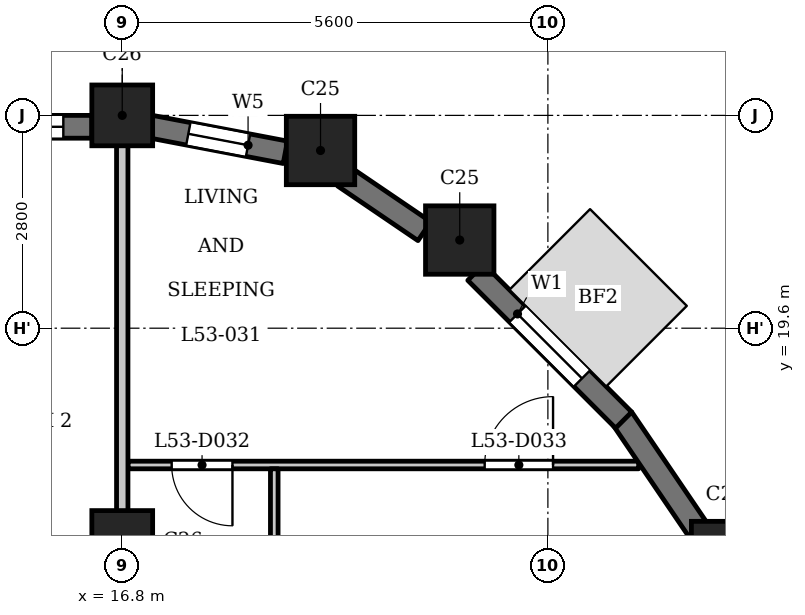
"""IFC4 building model, lengths in metres.
Left out: names, types, materials, properties, quantities, classifications, styles, units other than length and angle.
Written with IfcOpenShell. Run it as: python <this file> out.ifc"""

import sys

from ifc_helpers import new_model, si_unit, direction, frame, frame_2d, origin, origin_2d, place, context, subcontext, project, spatial, rectangle, extrude, element, fill, save


model = new_model("IFC4")
c1 = context("Model", 3, precision=1e-05, world=origin(), true_north=direction((0.0, 1.0)))
c2 = subcontext(c1, "Body", "Model", "MODEL_VIEW")
j1 = project(units=[si_unit("LENGTHUNIT", "METRE"), si_unit("PLANEANGLEUNIT", "RADIAN")], contexts=[c1])
p1 = place(None, origin())
s1 = spatial("IfcSite", under=j1, at=p1, CompositionType="ELEMENT")
p2 = place(p1, origin())
s2 = spatial("IfcBuilding", under=s1, at=p2, CompositionType="ELEMENT")
p3 = place(p2, frame((0.0, 0.0, 206.4)))
s3 = spatial("IfcBuildingStorey", under=s2, at=p3, CompositionType="ELEMENT", Elevation=206.4)
for number, where, z_axis, x_axis in (
    (1, (24.738, 16.609, 0.0), (0.0, 0.0, 1.0), (1.0, 0.0, 0.0)),
    (2, (21.24, 20.76, 0.0), (0.0, 0.0, 1.0), (1.0, 0.0, 0.0)),
    (3, (19.409, 21.938, 0.0), (0.0, 0.0, 1.0), (1.0, 0.0, 0.0)),
):
    element("IfcColumn", number, at=place(p3, frame(where, z_axis=z_axis, x_axis=x_axis)), inside=s3, PredefinedType="COLUMN", context=c2, shape_type="SweptSolid", body=[
        extrude(rectangle(XDim=0.9, YDim=0.9, at=origin_2d()), origin(), (0.0, 0.0, 1.0), 3.5),
    ])
for number, where, z_axis, x_axis in (
    (4, (16.8, 16.8, 0.0), (0.0, 0.0, 1.0), (1.0, 0.0, 0.0)),
    (5, (16.8, 22.4, 0.0), (0.0, 0.0, 1.0), (1.0, 0.0, 0.0)),
):
    element("IfcColumn", number, at=place(p3, frame(where, z_axis=z_axis, x_axis=x_axis)), inside=s3, PredefinedType="COLUMN", context=c2, shape_type="SweptSolid", body=[
        extrude(rectangle(XDim=0.8, YDim=0.8, at=origin_2d()), origin(), (0.0, 0.0, 1.0), 3.5),
    ])
p4 = place(p3, frame((24.394, 16.919, 0.0), z_axis=(0.0, 0.0, 1.0), x_axis=(-0.562040093569, 0.827109988588, 0.0)))
e6 = element("IfcWall", 6, at=p4, inside=s3, PredefinedType="SOLIDWALL", context=c2, shape_type="SweptSolid", body=[
    extrude(rectangle(XDim=1.806, YDim=0.3, at=frame_2d((0.903, 0.0))), origin(), (0.0, 0.0, 1.0), 2.5),
])
p5 = place(p3, frame((23.397, 18.391, 0.0), z_axis=(0.0, 0.0, 1.0), x_axis=(-0.707106781187, 0.707106781187, 0.0)))
e7 = element("IfcWall", 7, at=p5, inside=s3, PredefinedType="SOLIDWALL", context=c2, shape_type="SweptSolid", body=[
    extrude(rectangle(XDim=2.75, YDim=0.3, at=frame_2d((1.375, 0.0))), origin(), (0.0, 0.0, 1.0), 2.5),
])
p6 = place(p5, frame((0.775, 0.0, 0.6)))
e8 = element("IfcOpeningElement", 8, at=p6, cuts=e7, PredefinedType="OPENING", context=c2, shape_type="SweptSolid", body=[
    extrude(rectangle(XDim=1.2, YDim=1.55, at=frame_2d((0.6, 0.775))), frame((0.0, 0.16, 0.0), z_axis=(0.0, -1.0, 0.0), x_axis=(1.0, 0.0, 0.0)), (0.0, 0.0, 1.0), 0.32),
])
p7 = place(p3, frame((20.775, 20.876, 0.0), z_axis=(0.0, 0.0, 1.0), x_axis=(-0.827075824828, 0.562090366388, 0.0)))
e9 = element("IfcWall", 9, at=p7, inside=s3, PredefinedType="SOLIDWALL", context=c2, shape_type="SweptSolid", body=[
    extrude(rectangle(XDim=1.277, YDim=0.3, at=frame_2d((0.638, 0.0))), origin(), (0.0, 0.0, 1.0), 2.5),
])
p8 = place(p3, frame((18.946, 21.914, 0.0), z_axis=(0.0, 0.0, 1.0), x_axis=(-0.98230529033, 0.187286722942, 0.0)))
e10 = element("IfcWall", 10, at=p8, inside=s3, PredefinedType="SOLIDWALL", context=c2, shape_type="SweptSolid", body=[
    extrude(rectangle(XDim=1.799, YDim=0.3, at=frame_2d((0.899, 0.0))), origin(), (0.0, 0.0, 1.0), 2.5),
])
p9 = place(p8, frame((0.5, 0.0, 0.6)))
e11 = element("IfcOpeningElement", 11, at=p9, cuts=e10, PredefinedType="OPENING", context=c2, shape_type="SweptSolid", body=[
    extrude(rectangle(XDim=0.8, YDim=1.55, at=frame_2d((0.4, 0.775))), frame((0.0, 0.16, 0.0), z_axis=(0.0, -1.0, 0.0), x_axis=(1.0, 0.0, 0.0)), (0.0, 0.0, 1.0), 0.32),
])
p10 = place(p3, frame((16.4, 22.25, 0.0), z_axis=(0.0, 0.0, 1.0), x_axis=(-1.0, 0.0, 0.0)))
e12 = element("IfcWall", 12, at=p10, inside=s3, PredefinedType="SOLIDWALL", context=c2, shape_type="SweptSolid", body=[
    extrude(rectangle(XDim=1.95, YDim=0.3, at=frame_2d((0.975, 0.0))), origin(), (0.0, 0.0, 1.0), 2.5),
])
p11 = place(p10, frame((0.375, 0.0, 0.6)))
e13 = element("IfcOpeningElement", 13, at=p11, cuts=e12, PredefinedType="OPENING", context=c2, shape_type="SweptSolid", body=[
    extrude(rectangle(XDim=1.2, YDim=1.55, at=frame_2d((0.6, 0.775))), frame((0.0, 0.16, 0.0), z_axis=(0.0, -1.0, 0.0), x_axis=(1.0, 0.0, 0.0)), (0.0, 0.0, 1.0), 0.32),
])
p12 = place(p3, frame((16.875, 17.8, 0.0), z_axis=(0.0, 0.0, 1.0), x_axis=(1.0, 0.0, 0.0)))
e14 = element("IfcWall", 14, at=p12, inside=s3, PredefinedType="PARTITIONING", context=c2, shape_type="SweptSolid", body=[
    extrude(rectangle(XDim=6.719, YDim=0.1, at=frame_2d((3.359, 0.0))), origin(), (0.0, 0.0, 1.0), 3.2),
])
p13 = place(p12, frame((0.575, 0.0, 0.0)))
e15 = element("IfcOpeningElement", 15, at=p13, cuts=e14, PredefinedType="OPENING", context=c2, shape_type="SweptSolid", body=[
    extrude(rectangle(XDim=0.8, YDim=2.1, at=frame_2d((0.4, 1.05))), frame((0.0, 0.06, 0.0), z_axis=(0.0, -1.0, 0.0), x_axis=(1.0, 0.0, 0.0)), (0.0, 0.0, 1.0), 0.12),
])
p14 = place(p12, frame((4.693, 0.0, 0.0)))
e16 = element("IfcOpeningElement", 16, at=p14, cuts=e14, PredefinedType="OPENING", context=c2, shape_type="SweptSolid", body=[
    extrude(rectangle(XDim=0.9, YDim=2.1, at=frame_2d((0.45, 1.05))), frame((0.0, 0.06, 0.0), z_axis=(0.0, -1.0, 0.0), x_axis=(1.0, 0.0, 0.0)), (0.0, 0.0, 1.0), 0.12),
])
p15 = place(p3, frame((16.8, 15.475, 0.0), z_axis=(0.0, 0.0, 1.0), x_axis=(0.0, 1.0, 0.0)))
e17 = element("IfcWall", 17, at=p15, inside=s3, PredefinedType="PARTITIONING", context=c2, shape_type="SweptSolid", body=[
    extrude(rectangle(XDim=6.835, YDim=0.15, at=frame_2d((3.417, 0.0))), origin(), (0.0, 0.0, 1.0), 2.55),
])
p16 = place(p3, frame((18.8, 15.475, 0.0), z_axis=(0.0, 0.0, 1.0), x_axis=(0.0, 1.0, 0.0)))
e18 = element("IfcWall", 18, at=p16, inside=s3, PredefinedType="PARTITIONING", context=c2, shape_type="SweptSolid", body=[
    extrude(rectangle(XDim=2.275, YDim=0.1, at=frame_2d((1.137, 0.0))), origin(), (0.0, 0.0, 1.0), 3.2),
])
p17 = place(p13, origin())
e19 = element("IfcDoor", 19, at=p17, inside=s3, OperationType="SINGLE_SWING_RIGHT", PredefinedType="DOOR", context=c2, shape_type="SweptSolid", body=[
    extrude(rectangle(XDim=0.8, YDim=2.1, at=frame_2d((0.4, 1.05))), frame((0.0, 0.025, 0.0), z_axis=(0.0, -1.0, 0.0), x_axis=(1.0, 0.0, 0.0)), (0.0, 0.0, 1.0), 0.05),
])
fill(e15, e19)
p18 = place(p14, origin())
e20 = element("IfcDoor", 20, at=p18, inside=s3, OperationType="SINGLE_SWING_LEFT", PredefinedType="DOOR", context=c2, shape_type="SweptSolid", body=[
    extrude(rectangle(XDim=0.9, YDim=2.1, at=frame_2d((0.45, 1.05))), frame((0.0, 0.025, 0.0), z_axis=(0.0, -1.0, 0.0), x_axis=(1.0, 0.0, 0.0)), (0.0, 0.0, 1.0), 0.05),
])
fill(e16, e20)
p19 = place(p6, origin())
e21 = element("IfcWindow", 21, at=p19, inside=s3, PartitioningType="SINGLE_PANEL", PredefinedType="WINDOW", context=c2, shape_type="SweptSolid", body=[
    extrude(rectangle(XDim=1.2, YDim=1.55, at=frame_2d((0.6, 0.775))), frame((0.0, 0.03, 0.0), z_axis=(0.0, -1.0, 0.0), x_axis=(1.0, 0.0, 0.0)), (0.0, 0.0, 1.0), 0.06),
])
fill(e8, e21)
p20 = place(p9, origin())
e22 = element("IfcWindow", 22, at=p20, inside=s3, PartitioningType="SINGLE_PANEL", PredefinedType="WINDOW", context=c2, shape_type="SweptSolid", body=[
    extrude(rectangle(XDim=0.8, YDim=1.55, at=frame_2d((0.4, 0.775))), frame((0.0, 0.03, 0.0), z_axis=(0.0, -1.0, 0.0), x_axis=(1.0, 0.0, 0.0)), (0.0, 0.0, 1.0), 0.06),
])
fill(e11, e22)
p21 = place(p11, origin())
e23 = element("IfcWindow", 23, at=p21, inside=s3, PartitioningType="SINGLE_PANEL", PredefinedType="WINDOW", context=c2, shape_type="SweptSolid", body=[
    extrude(rectangle(XDim=1.2, YDim=1.55, at=frame_2d((0.6, 0.775))), frame((0.0, 0.03, 0.0), z_axis=(0.0, -1.0, 0.0), x_axis=(1.0, 0.0, 0.0)), (0.0, 0.0, 1.0), 0.06),
])
fill(e13, e23)
save(model, sys.argv[1])
